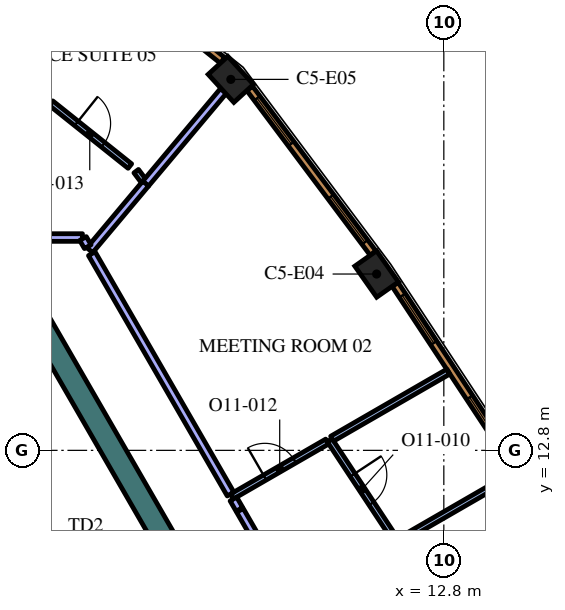
"""IFC4 building model, lengths in metres.
Left out: names, types, materials, properties, quantities, classifications, styles, units other than length and angle.
Written with IfcOpenShell. Run it as: python <this file> out.ifc"""

import sys

from ifc_helpers import new_model, si_unit, direction, frame, frame_2d, origin, origin_2d, place, context, subcontext, project, spatial, rectangle, extrude, element, fill, save


model = new_model("IFC4")
c1 = context("Model", 3, precision=1e-05, world=origin(), true_north=direction((0.0, 1.0)))
c2 = subcontext(c1, "Body", "Model", "MODEL_VIEW")
j1 = project(units=[si_unit("LENGTHUNIT", "METRE"), si_unit("PLANEANGLEUNIT", "RADIAN")], contexts=[c1])
p1 = place(None, origin())
s1 = spatial("IfcSite", under=j1, at=p1, CompositionType="ELEMENT")
p2 = place(p1, origin())
s2 = spatial("IfcBuilding", under=s1, at=p2, CompositionType="ELEMENT")
p3 = place(p2, frame((0.0, 0.0, 271.2)))
s3 = spatial("IfcBuildingStorey", under=s2, at=p3, CompositionType="ELEMENT", Elevation=271.2)
for number, where, z_axis, x_axis in (
    (1, (11.032, 17.44, 0.0), (0.0, 0.0, 1.0), (-0.575, 0.818, 0.0)),
    (2, (7.195, 22.561, 0.0), (0.0, 0.0, 1.0), (-0.676, 0.737, 0.0)),
):
    element("IfcColumn", number, at=place(p3, frame(where, z_axis=z_axis, x_axis=x_axis)), inside=s3, PredefinedType="COLUMN", context=c2, shape_type="SweptSolid", body=[
        extrude(rectangle(XDim=1.0, YDim=0.7, at=origin_2d()), origin(), (0.0, 0.0, 1.0), 4.2),
    ])
p4 = place(p3, frame((1.989, 16.456, 0.0), z_axis=(0.0, 0.0, 1.0), x_axis=(0.49999102663, -0.8660305845, 0.0)))
e3 = element("IfcWall", 3, at=p4, inside=s3, PredefinedType="SOLIDWALL", context=c2, shape_type="SweptSolid", body=[
    extrude(rectangle(XDim=12.406, YDim=0.6, at=frame_2d((6.203, 0.0))), origin(), (0.0, 0.0, 1.0), 4.2),
])
p5 = place(p3, frame((11.564, 10.387, 0.0), z_axis=(0.0, 0.0, 1.0), x_axis=(0.86604641216, 0.499963610661, 0.0)))
e4 = element("IfcWall", 4, at=p5, inside=s3, PredefinedType="PARTITIONING", context=c2, shape_type="SweptSolid", body=[
    extrude(rectangle(XDim=3.096, YDim=0.15, at=frame_2d((1.548, 0.0))), origin(), (0.0, 0.0, 1.0), 3.55),
])
p6 = place(p3, frame((9.795, 13.068, 0.0), z_axis=(0.0, 0.0, 1.0), x_axis=(0.550767347659, -0.834658809786, 0.0)))
e5 = element("IfcWall", 5, at=p6, inside=s3, PredefinedType="PARTITIONING", context=c2, shape_type="SweptSolid", body=[
    extrude(rectangle(XDim=2.999, YDim=0.15, at=frame_2d((1.5, 0.0))), origin(), (0.0, 0.0, 1.0), 3.55),
])
p7 = place(p6, frame((1.099, 0.0, 0.0)))
e6 = element("IfcOpeningElement", 6, at=p7, cuts=e5, PredefinedType="OPENING", context=c2, shape_type="SweptSolid", body=[
    extrude(rectangle(XDim=0.9, YDim=2.1, at=frame_2d((0.45, 1.05))), frame((0.0, 0.085, 0.0), z_axis=(0.0, -1.0, 0.0), x_axis=(1.0, 0.0, 0.0)), (0.0, 0.0, 1.0), 0.17),
])
p8 = place(p3, frame((9.86, 13.106, 0.0), z_axis=(0.0, 0.0, 1.0), x_axis=(0.866022094817, 0.500005731256, 0.0)))
e7 = element("IfcWall", 7, at=p8, inside=s3, PredefinedType="PARTITIONING", context=c2, shape_type="SweptSolid", body=[
    extrude(rectangle(XDim=3.531, YDim=0.15, at=frame_2d((1.766, 0.0))), origin(), (0.0, 0.0, 1.0), 3.55),
])
p9 = place(p3, frame((7.226, 11.585, 0.0), z_axis=(0.0, 0.0, 1.0), x_axis=(0.866021079084, 0.500007490527, 0.0)))
e8 = element("IfcWall", 8, at=p9, inside=s3, PredefinedType="PARTITIONING", context=c2, shape_type="SweptSolid", body=[
    extrude(rectangle(XDim=2.892, YDim=0.15, at=frame_2d((1.446, 0.0))), origin(), (0.0, 0.0, 1.0), 3.55),
])
p10 = place(p9, frame((1.0, 0.0, 0.0)))
e9 = element("IfcOpeningElement", 9, at=p10, cuts=e8, PredefinedType="OPENING", context=c2, shape_type="SweptSolid", body=[
    extrude(rectangle(XDim=0.9, YDim=2.1, at=frame_2d((0.45, 1.05))), frame((0.0, 0.085, 0.0), z_axis=(0.0, -1.0, 0.0), x_axis=(1.0, 0.0, 0.0)), (0.0, 0.0, 1.0), 0.17),
])
p11 = place(p3, frame((13.436, 0.829, 0.0), z_axis=(0.0, 0.0, 1.0), x_axis=(-0.49999894854, 0.866026010844, 0.0)))
e10 = element("IfcWall", 10, at=p11, inside=s3, PredefinedType="PARTITIONING", context=c2, shape_type="SweptSolid", body=[
    extrude(rectangle(XDim=12.0, YDim=0.2, at=frame_2d((6.0, 0.0))), origin(), (0.0, 0.0, 1.0), 3.55),
])
p12 = place(p11, frame((5.5, 0.0, 0.0)))
e11 = element("IfcOpeningElement", 11, at=p12, cuts=e10, PredefinedType="OPENING", context=c2, shape_type="SweptSolid", body=[
    extrude(rectangle(XDim=1.0, YDim=2.1, at=frame_2d((0.5, 1.05))), frame((0.0, 0.11, 0.0), z_axis=(0.0, -1.0, 0.0), x_axis=(1.0, 0.0, 0.0)), (0.0, 0.0, 1.0), 0.22),
])
p13 = place(p3, frame((7.421, 11.247, 0.0), z_axis=(0.0, 0.0, 1.0), x_axis=(-0.500303403544, 0.865850162789, 0.0)))
e12 = element("IfcWall", 12, at=p13, inside=s3, PredefinedType="PARTITIONING", context=c2, shape_type="SweptSolid", body=[
    extrude(rectangle(XDim=0.315, YDim=0.2, at=frame_2d((0.158, 0.0))), origin(), (0.0, 0.0, 1.0), 3.55),
])
p14 = place(p3, frame((4.95, 19.814, 0.0), z_axis=(0.0, 0.0, 1.0), x_axis=(0.642981953866, 0.765881326971, 0.0)))
e13 = element("IfcWall", 13, at=p14, inside=s3, PredefinedType="PARTITIONING", context=c2, shape_type="SweptSolid", body=[
    extrude(rectangle(XDim=3.188, YDim=0.2, at=frame_2d((1.594, 0.0))), origin(), (0.0, 0.0, 1.0), 3.55),
])
p15 = place(p3, frame((3.483, 18.067, 0.0), z_axis=(0.0, 0.0, 1.0), x_axis=(0.642896944312, 0.765952687177, 0.0)))
e14 = element("IfcWall", 14, at=p15, inside=s3, PredefinedType="PARTITIONING", context=c2, shape_type="SweptSolid", body=[
    extrude(rectangle(XDim=2.29, YDim=0.2, at=frame_2d((1.145, 0.0))), origin(), (0.0, 0.0, 1.0), 3.55),
])
p16 = place(p3, frame((7.188, 11.65, 0.0), z_axis=(0.0, 0.0, 1.0), x_axis=(-0.499989634868, 0.866031388014, 0.0)))
e15 = element("IfcWall", 15, at=p16, inside=s3, PredefinedType="PARTITIONING", context=c2, shape_type="SweptSolid", body=[
    extrude(rectangle(XDim=7.303, YDim=0.2, at=frame_2d((3.652, 0.0))), origin(), (0.0, 0.0, 1.0), 3.55),
])
p17 = place(p3, frame((4.891, 19.899, 0.0), z_axis=(0.0, 0.0, 1.0), x_axis=(-0.6, 0.8, 0.0)))
e16 = element("IfcWall", 16, at=p17, inside=s3, PredefinedType="PARTITIONING", context=c2, shape_type="SweptSolid", body=[
    extrude(rectangle(XDim=0.309, YDim=0.15, at=frame_2d((0.154, 0.0))), origin(), (0.0, 0.0, 1.0), 3.55),
])
p18 = place(p3, frame((2.462, 21.937, 0.0), z_axis=(0.0, 0.0, 1.0), x_axis=(0.781630346222, -0.62374193531, 0.0)))
e17 = element("IfcWall", 17, at=p18, inside=s3, PredefinedType="PARTITIONING", context=c2, shape_type="SweptSolid", body=[
    extrude(rectangle(XDim=2.656, YDim=0.15, at=frame_2d((1.328, 0.0))), origin(), (0.0, 0.0, 1.0), 3.55),
])
p19 = place(p18, frame((0.857, 0.0, 0.0)))
e18 = element("IfcOpeningElement", 18, at=p19, cuts=e17, PredefinedType="OPENING", context=c2, shape_type="SweptSolid", body=[
    extrude(rectangle(XDim=0.9, YDim=2.1, at=frame_2d((0.45, 1.05))), frame((0.0, 0.085, 0.0), z_axis=(0.0, -1.0, 0.0), x_axis=(1.0, 0.0, 0.0)), (0.0, 0.0, 1.0), 0.17),
])
p20 = place(p3, frame((3.291, 18.4, 0.0), z_axis=(0.0, 0.0, 1.0), x_axis=(-1.0, 0.0, 0.0)))
e19 = element("IfcWall", 19, at=p20, inside=s3, PredefinedType="PARTITIONING", context=c2, shape_type="SweptSolid", body=[
    extrude(rectangle(XDim=6.582, YDim=0.2, at=frame_2d((3.291, 0.0))), origin(), (0.0, 0.0, 1.0), 3.55),
])
p21 = place(p3, frame((3.43, 18.159, 0.0), z_axis=(0.0, 0.0, 1.0), x_axis=(-0.499949632511, 0.866054481515, 0.0)))
e20 = element("IfcWall", 20, at=p21, inside=s3, PredefinedType="PARTITIONING", context=c2, shape_type="SweptSolid", body=[
    extrude(rectangle(XDim=0.248, YDim=0.2, at=frame_2d((0.124, 0.0))), origin(), (0.0, 0.0, 1.0), 3.55),
])
p22 = place(p3, frame((14.496, 12.653, 0.0), z_axis=(0.0, 0.0, 1.0), x_axis=(-0.550744054781, 0.83467417962, 0.0)))
e21 = element("IfcWall", 21, at=p22, inside=s3, PredefinedType="SOLIDWALL", context=c2, shape_type="SweptSolid", body=[
    extrude(rectangle(XDim=5.406, YDim=0.19, at=frame_2d((2.703, 0.0))), origin(), (0.0, 0.0, 1.0), 3.95),
])
p23 = place(p22, frame((0.346, 0.0, 0.6)))
e22 = element("IfcOpeningElement", 22, at=p23, cuts=e21, PredefinedType="OPENING", context=c2, shape_type="SweptSolid", body=[
    extrude(rectangle(XDim=1.5, YDim=2.85, at=frame_2d((0.75, 1.425))), frame((0.0, 0.105, 0.0), z_axis=(0.0, -1.0, 0.0), x_axis=(1.0, 0.0, 0.0)), (0.0, 0.0, 1.0), 0.21),
])
p24 = place(p22, frame((3.559, 0.0, 0.6)))
e23 = element("IfcOpeningElement", 23, at=p24, cuts=e21, PredefinedType="OPENING", context=c2, shape_type="SweptSolid", body=[
    extrude(rectangle(XDim=1.5, YDim=2.85, at=frame_2d((0.75, 1.425))), frame((0.0, 0.105, 0.0), z_axis=(0.0, -1.0, 0.0), x_axis=(1.0, 0.0, 0.0)), (0.0, 0.0, 1.0), 0.21),
])
p25 = place(p3, frame((10.938, 17.99, 0.0), z_axis=(0.0, 0.0, 1.0), x_axis=(-0.599559865294, 0.800329911929, 0.0)))
e24 = element("IfcWall", 24, at=p25, inside=s3, PredefinedType="SOLIDWALL", context=c2, shape_type="SweptSolid", body=[
    extrude(rectangle(XDim=5.415, YDim=0.19, at=frame_2d((2.708, 0.0))), origin(), (0.0, 0.0, 1.0), 3.95),
])
p26 = place(p25, frame((0.358, 0.0, 0.6)))
e25 = element("IfcOpeningElement", 25, at=p26, cuts=e24, PredefinedType="OPENING", context=c2, shape_type="SweptSolid", body=[
    extrude(rectangle(XDim=1.5, YDim=2.85, at=frame_2d((0.75, 1.425))), frame((0.0, 0.105, 0.0), z_axis=(0.0, -1.0, 0.0), x_axis=(1.0, 0.0, 0.0)), (0.0, 0.0, 1.0), 0.21),
])
p27 = place(p25, frame((3.593, 0.0, 0.6)))
e26 = element("IfcOpeningElement", 26, at=p27, cuts=e24, PredefinedType="OPENING", context=c2, shape_type="SweptSolid", body=[
    extrude(rectangle(XDim=1.5, YDim=2.85, at=frame_2d((0.75, 1.425))), frame((0.0, 0.105, 0.0), z_axis=(0.0, -1.0, 0.0), x_axis=(1.0, 0.0, 0.0)), (0.0, 0.0, 1.0), 0.21),
])
p28 = place(p3, frame((6.977, 23.061, 0.0), z_axis=(0.0, 0.0, 1.0), x_axis=(-0.781626234064, 0.623747088349, 0.0)))
e27 = element("IfcWall", 27, at=p28, inside=s3, PredefinedType="SOLIDWALL", context=c2, shape_type="SweptSolid", body=[
    extrude(rectangle(XDim=3.237, YDim=0.19, at=frame_2d((1.618, 0.0))), origin(), (0.0, 0.0, 1.0), 3.95),
])
p29 = place(p28, frame((1.068, 0.0, 0.6)))
e28 = element("IfcOpeningElement", 28, at=p29, cuts=e27, PredefinedType="OPENING", context=c2, shape_type="SweptSolid", body=[
    extrude(rectangle(XDim=1.1, YDim=2.85, at=frame_2d((0.55, 1.425))), frame((0.0, 0.105, 0.0), z_axis=(0.0, -1.0, 0.0), x_axis=(1.0, 0.0, 0.0)), (0.0, 0.0, 1.0), 0.21),
])
p30 = place(p7, origin())
e29 = element("IfcDoor", 29, at=p30, inside=s3, OperationType="SINGLE_SWING_RIGHT", PredefinedType="DOOR", context=c2, shape_type="SweptSolid", body=[
    extrude(rectangle(XDim=0.9, YDim=2.1, at=frame_2d((0.45, 1.05))), frame((0.0, 0.025, 0.0), z_axis=(0.0, -1.0, 0.0), x_axis=(1.0, 0.0, 0.0)), (0.0, 0.0, 1.0), 0.05),
])
fill(e6, e29)
p31 = place(p10, origin())
e30 = element("IfcDoor", 30, at=p31, inside=s3, OperationType="SINGLE_SWING_RIGHT", PredefinedType="DOOR", context=c2, shape_type="SweptSolid", body=[
    extrude(rectangle(XDim=0.9, YDim=2.1, at=frame_2d((0.45, 1.05))), frame((0.0, 0.025, 0.0), z_axis=(0.0, -1.0, 0.0), x_axis=(1.0, 0.0, 0.0)), (0.0, 0.0, 1.0), 0.05),
])
fill(e9, e30)
p32 = place(p19, origin())
e31 = element("IfcDoor", 31, at=p32, inside=s3, OperationType="SINGLE_SWING_LEFT", PredefinedType="DOOR", context=c2, shape_type="SweptSolid", body=[
    extrude(rectangle(XDim=0.9, YDim=2.1, at=frame_2d((0.45, 1.05))), frame((0.0, 0.025, 0.0), z_axis=(0.0, -1.0, 0.0), x_axis=(1.0, 0.0, 0.0)), (0.0, 0.0, 1.0), 0.05),
])
fill(e18, e31)
p33 = place(p23, origin())
e32 = element("IfcWindow", 32, at=p33, inside=s3, PartitioningType="SINGLE_PANEL", PredefinedType="WINDOW", context=c2, shape_type="SweptSolid", body=[
    extrude(rectangle(XDim=1.5, YDim=2.85, at=frame_2d((0.75, 1.425))), frame((0.0, 0.045, 0.0), z_axis=(0.0, -1.0, 0.0), x_axis=(1.0, 0.0, 0.0)), (0.0, 0.0, 1.0), 0.06),
])
fill(e22, e32)
p34 = place(p24, origin())
e33 = element("IfcWindow", 33, at=p34, inside=s3, PartitioningType="SINGLE_PANEL", PredefinedType="WINDOW", context=c2, shape_type="SweptSolid", body=[
    extrude(rectangle(XDim=1.5, YDim=2.85, at=frame_2d((0.75, 1.425))), frame((0.0, 0.045, 0.0), z_axis=(0.0, -1.0, 0.0), x_axis=(1.0, 0.0, 0.0)), (0.0, 0.0, 1.0), 0.06),
])
fill(e23, e33)
p35 = place(p26, origin())
e34 = element("IfcWindow", 34, at=p35, inside=s3, PartitioningType="SINGLE_PANEL", PredefinedType="WINDOW", context=c2, shape_type="SweptSolid", body=[
    extrude(rectangle(XDim=1.5, YDim=2.85, at=frame_2d((0.75, 1.425))), frame((0.0, 0.045, 0.0), z_axis=(0.0, -1.0, 0.0), x_axis=(1.0, 0.0, 0.0)), (0.0, 0.0, 1.0), 0.06),
])
fill(e25, e34)
p36 = place(p27, origin())
e35 = element("IfcWindow", 35, at=p36, inside=s3, PartitioningType="SINGLE_PANEL", PredefinedType="WINDOW", context=c2, shape_type="SweptSolid", body=[
    extrude(rectangle(XDim=1.5, YDim=2.85, at=frame_2d((0.75, 1.425))), frame((0.0, 0.045, 0.0), z_axis=(0.0, -1.0, 0.0), x_axis=(1.0, 0.0, 0.0)), (0.0, 0.0, 1.0), 0.06),
])
fill(e26, e35)
save(model, sys.argv[1])
